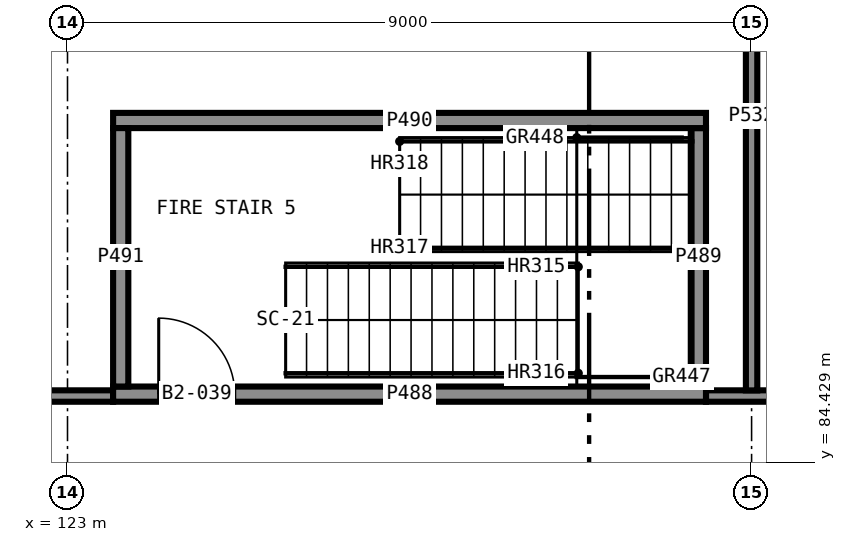
"""IFC4 building model, lengths in metres.
Left out: names, types, materials, properties, quantities, classifications, styles, units other than length and angle.
Written with IfcOpenShell. Run it as: python <this file> out.ifc"""

import sys

from ifc_helpers import new_model, si_unit, direction, frame, frame_2d, origin, place, context, subcontext, project, spatial, rectangle, extrude, element, fill, save


model = new_model("IFC4")
c1 = context("Model", 3, precision=1e-05, world=origin(), true_north=direction((0.0, 1.0)))
c2 = subcontext(c1, "Body", "Model", "MODEL_VIEW")
j1 = project(units=[si_unit("LENGTHUNIT", "METRE"), si_unit("PLANEANGLEUNIT", "RADIAN")], contexts=[c1])
p1 = place(None, origin())
s1 = spatial("IfcSite", under=j1, at=p1, CompositionType="ELEMENT")
p2 = place(p1, origin())
s2 = spatial("IfcBuilding", under=s1, at=p2, CompositionType="ELEMENT")
p3 = place(p2, frame((0.0, 0.0, -10.0)))
s3 = spatial("IfcBuildingStorey", under=s2, at=p3, CompositionType="ELEMENT", Elevation=-10.0)
p4 = place(p3, frame((123.6, 85.325, 0.0), z_axis=(0.0, 0.0, 1.0), x_axis=(1.0, 0.0, 0.0)))
e1 = element("IfcWall", 1, at=p4, inside=s3, PredefinedType="SHEAR", context=c2, shape_type="SweptSolid", body=[
    extrude(rectangle(XDim=7.8, YDim=0.2, at=frame_2d((3.9, 0.0))), origin(), (0.0, 0.0, 1.0), 4.7),
])
p5 = place(p4, frame((0.6, 0.0, 0.0)))
e2 = element("IfcOpeningElement", 2, at=p5, cuts=e1, PredefinedType="OPENING", context=c2, shape_type="SweptSolid", body=[
    extrude(rectangle(XDim=1.0, YDim=2.1, at=frame_2d((0.5, 1.05))), frame((0.0, 0.11, 0.0), z_axis=(0.0, -1.0, 0.0), x_axis=(1.0, 0.0, 0.0)), (0.0, 0.0, 1.0), 0.22),
])
p6 = place(p3, frame((131.3, 85.425, 0.0), z_axis=(0.0, 0.0, 1.0), x_axis=(0.0, 1.0, 0.0)))
e3 = element("IfcWall", 3, at=p6, inside=s3, PredefinedType="SHEAR", context=c2, shape_type="SweptSolid", body=[
    extrude(rectangle(XDim=3.4, YDim=0.2, at=frame_2d((1.7, 0.0))), origin(), (0.0, 0.0, 1.0), 4.7),
])
p7 = place(p3, frame((131.4, 88.925, 0.0), z_axis=(0.0, 0.0, 1.0), x_axis=(-1.0, 0.0, 0.0)))
e4 = element("IfcWall", 4, at=p7, inside=s3, PredefinedType="SHEAR", context=c2, shape_type="SweptSolid", body=[
    extrude(rectangle(XDim=7.8, YDim=0.2, at=frame_2d((3.9, 0.0))), origin(), (0.0, 0.0, 1.0), 4.7),
])
p8 = place(p3, frame((123.7, 88.825, 0.0), z_axis=(0.0, 0.0, 1.0), x_axis=(0.0, -1.0, 0.0)))
e5 = element("IfcWall", 5, at=p8, inside=s3, PredefinedType="SHEAR", context=c2, shape_type="SweptSolid", body=[
    extrude(rectangle(XDim=3.4, YDim=0.2, at=frame_2d((1.7, 0.0))), origin(), (0.0, 0.0, 1.0), 4.7),
])
p9 = place(p3, frame((120.775, 85.3, 0.0), z_axis=(0.0, 0.0, 1.0), x_axis=(1.0, 0.0, 0.0)))
e6 = element("IfcWall", 6, at=p9, inside=s3, PredefinedType="PARTITIONING", context=c2, shape_type="SweptSolid", body=[
    extrude(rectangle(XDim=2.825, YDim=0.15, at=frame_2d((1.413, 0.0))), origin(), (0.0, 0.0, 1.0), 4.7),
])
p10 = place(p3, frame((131.4, 85.3, 0.0), z_axis=(0.0, 0.0, 1.0), x_axis=(1.0, 0.0, 0.0)))
e7 = element("IfcWall", 7, at=p10, inside=s3, PredefinedType="PARTITIONING", context=c2, shape_type="SweptSolid", body=[
    extrude(rectangle(XDim=11.825, YDim=0.15, at=frame_2d((5.913, 0.0))), origin(), (0.0, 0.0, 1.0), 4.7),
])
p11 = place(p3, frame((132.0, 85.374, 0.0), z_axis=(0.0, 0.0, 1.0), x_axis=(0.0, 1.0, 0.0)))
e8 = element("IfcWall", 8, at=p11, inside=s3, PredefinedType="PARTITIONING", context=c2, shape_type="SweptSolid", body=[
    extrude(rectangle(XDim=7.227, YDim=0.15, at=frame_2d((3.614, 0.0))), origin(), (0.0, 0.0, 1.0), 3.8),
])
p12 = place(p5, origin())
e9 = element("IfcDoor", 9, at=p12, inside=s3, OperationType="SINGLE_SWING_RIGHT", PredefinedType="DOOR", context=c2, shape_type="SweptSolid", body=[
    extrude(rectangle(XDim=1.0, YDim=2.1, at=frame_2d((0.5, 1.05))), frame((0.0, 0.025, 0.0), z_axis=(0.0, -1.0, 0.0), x_axis=(1.0, 0.0, 0.0)), (0.0, 0.0, 1.0), 0.05),
])
fill(e2, e9)
save(model, sys.argv[1])
